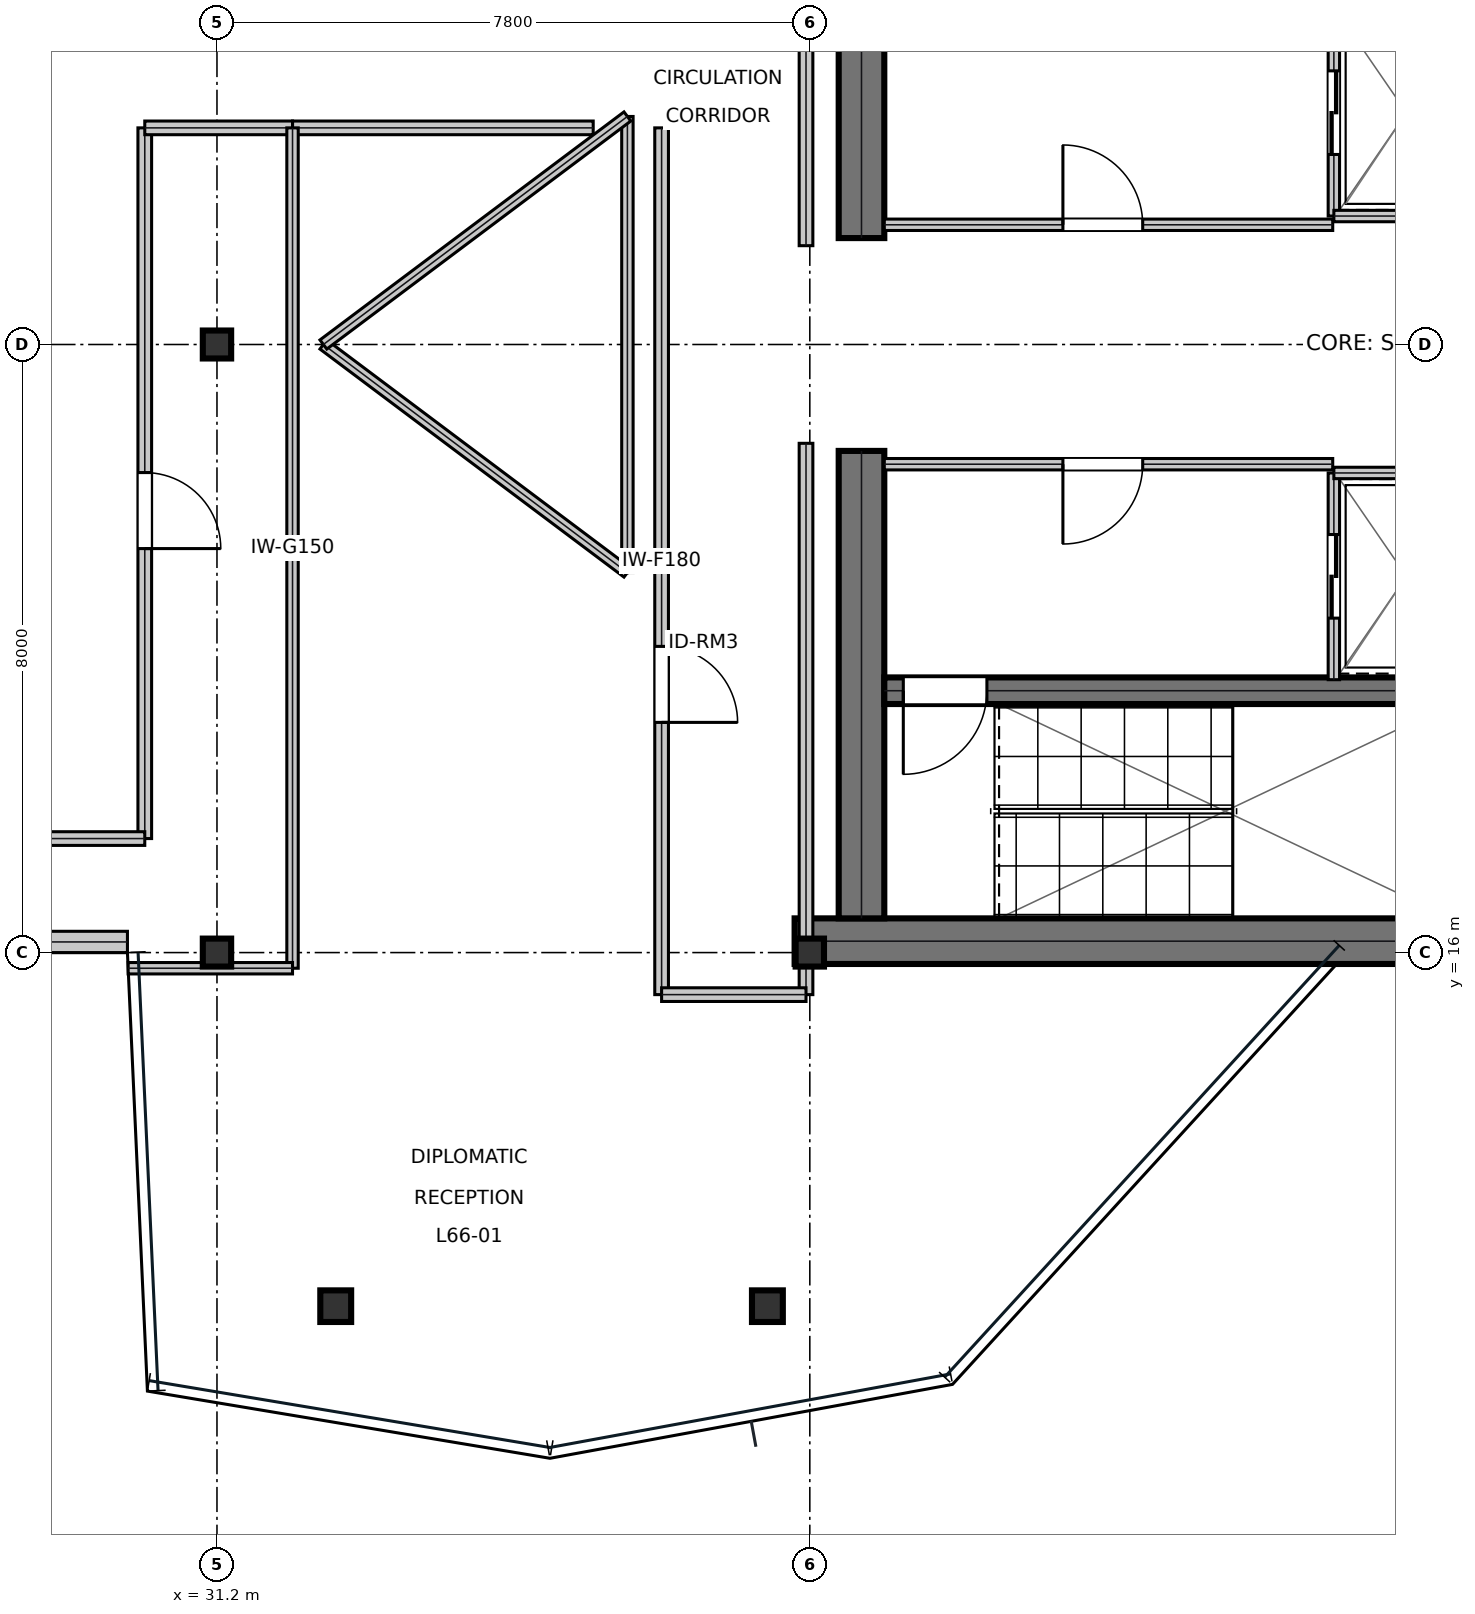
"""IFC4 building model, lengths in metres.
Left out: names, types, materials, properties, quantities, classifications, styles, units other than length and angle.
Written with IfcOpenShell. Run it as: python <this file> out.ifc"""

import sys

from ifc_helpers import new_model, si_unit, direction, frame, frame_2d, origin, origin_2d, place, context, subcontext, project, spatial, rectangle, i_section, extrude, element, fill, save


model = new_model("IFC4")
c1 = context("Model", 3, precision=1e-05, world=origin(), true_north=direction((0.0, 1.0)))
c2 = subcontext(c1, "Body", "Model", "MODEL_VIEW")
j1 = project(units=[si_unit("LENGTHUNIT", "METRE"), si_unit("PLANEANGLEUNIT", "RADIAN")], contexts=[c1])
p1 = place(None, origin())
s1 = spatial("IfcSite", under=j1, at=p1, CompositionType="ELEMENT")
p2 = place(p1, origin())
s2 = spatial("IfcBuilding", under=s1, at=p2, CompositionType="ELEMENT")
p3 = place(p2, frame((0.0, 0.0, 283.05)))
s3 = spatial("IfcBuildingStorey", under=s2, at=p3, CompositionType="ELEMENT", Elevation=283.05)
p4 = place(p3, frame((38.8, 16.15, 0.0), z_axis=(0.0, 0.0, 1.0), x_axis=(1.0, 0.0, 0.0)))
e1 = element("IfcWall", 1, at=p4, inside=s3, PredefinedType="SHEAR", context=c2, shape_type="SweptSolid", body=[
    extrude(rectangle(XDim=16.0, YDim=0.6, at=frame_2d((8.0, 0.0))), origin(), (0.0, 0.0, 1.0), 3.81),
])
for number, where, z_axis, x_axis in (
    (2, (39.68, 16.45, 0.0), (0.0, 0.0, 1.0), (0.0, 1.0, 0.0)),
    (3, (39.68, 25.4, 0.0), (0.0, 0.0, 1.0), (0.0, 1.0, 0.0)),
):
    element("IfcWall", number, at=place(p3, frame(where, z_axis=z_axis, x_axis=x_axis)), inside=s3, PredefinedType="SHEAR", context=c2, shape_type="SweptSolid", body=[
        extrude(rectangle(XDim=6.15, YDim=0.6, at=frame_2d((3.075, 0.0))), origin(), (0.0, 0.0, 1.0), 3.81),
    ])
p5 = place(p3, frame((39.98, 19.445, 0.0), z_axis=(0.0, 0.0, 1.0), x_axis=(1.0, 0.0, 0.0)))
e4 = element("IfcWall", 4, at=p5, inside=s3, PredefinedType="SHEAR", context=c2, shape_type="SweptSolid", body=[
    extrude(rectangle(XDim=7.71, YDim=0.35, at=frame_2d((3.855, 0.0))), origin(), (0.0, 0.0, 1.0), 3.81),
])
p6 = place(p5, frame((0.25, 0.0, 0.0)))
e5 = element("IfcOpeningElement", 5, at=p6, cuts=e4, PredefinedType="OPENING", context=c2, shape_type="SweptSolid", body=[
    extrude(rectangle(XDim=1.1, YDim=2.15, at=frame_2d((0.55, 1.075))), frame((0.0, 0.185, 0.0), z_axis=(0.0, -1.0, 0.0), x_axis=(1.0, 0.0, 0.0)), (0.0, 0.0, 1.0), 0.37),
])
for number, where, z_axis, x_axis in (
    (6, (31.2, 16.0, 0.0), (0.0, 0.0, 1.0), (1.0, 0.0, 0.0)),
    (7, (31.2, 24.0, 0.0), (0.0, 0.0, 1.0), (1.0, 0.0, 0.0)),
    (8, (39.0, 16.0, 0.0), (0.0, 0.0, 1.0), (1.0, 0.0, 0.0)),
):
    element("IfcColumn", number, at=place(p3, frame(where, z_axis=z_axis, x_axis=x_axis)), inside=s3, PredefinedType="COLUMN", context=c2, shape_type="SweptSolid", body=[
        extrude(i_section(OverallWidth=0.373, OverallDepth=0.368, WebThickness=0.015, FlangeThickness=0.024, at=origin_2d()), origin(), (0.0, 0.0, 1.0), 4.044),
    ])
for number, where, z_axis, x_axis in (
    (9, (32.762, 11.348, 0.016), (0.0, 0.0, 1.0), (1.0, 0.0, 0.0)),
    (10, (38.442, 11.348, 0.016), (0.0, 0.0, 1.0), (1.0, 0.0, 0.0)),
):
    element("IfcColumn", number, at=place(p3, frame(where, z_axis=z_axis, x_axis=x_axis)), inside=s3, PredefinedType="COLUMN", context=c2, shape_type="SweptSolid", body=[
        extrude(i_section(OverallWidth=0.406, OverallDepth=0.416, WebThickness=0.03, FlangeThickness=0.048, at=origin_2d()), origin(), (0.0, 0.0, 1.0), 4.018),
    ])
p7 = place(p3, frame((27.186, 16.14, 0.0), z_axis=(0.0, 0.0, 1.0), x_axis=(1.0, 0.0, 0.0)))
e11 = element("IfcWall", 11, at=p7, inside=s3, PredefinedType="STANDARD", context=c2, shape_type="SweptSolid", body=[
    extrude(rectangle(XDim=2.836, YDim=0.28, at=frame_2d((1.418, 0.0))), origin(), (0.0, 0.0, 1.0), 3.81),
])
p8 = place(p3, frame((39.98, 25.575, 0.0), z_axis=(0.0, 0.0, 1.0), x_axis=(1.0, 0.0, 0.0)))
e12 = element("IfcWall", 12, at=p8, inside=s3, PredefinedType="PARTITIONING", context=c2, shape_type="SweptSolid", body=[
    extrude(rectangle(XDim=5.9, YDim=0.15, at=frame_2d((2.95, 0.0))), origin(), (0.0, 0.0, 1.0), 3.81),
])
p9 = place(p8, frame((2.35, 0.0, 0.0)))
e13 = element("IfcOpeningElement", 13, at=p9, cuts=e12, PredefinedType="OPENING", context=c2, shape_type="SweptSolid", body=[
    extrude(rectangle(XDim=1.05, YDim=2.15, at=frame_2d((0.525, 1.075))), frame((0.0, 0.085, 0.0), z_axis=(0.0, -1.0, 0.0), x_axis=(1.0, 0.0, 0.0)), (0.0, 0.0, 1.0), 0.17),
])
p10 = place(p3, frame((39.98, 22.425, 0.0), z_axis=(0.0, 0.0, 1.0), x_axis=(1.0, 0.0, 0.0)))
e14 = element("IfcWall", 14, at=p10, inside=s3, PredefinedType="PARTITIONING", context=c2, shape_type="SweptSolid", body=[
    extrude(rectangle(XDim=5.9, YDim=0.15, at=frame_2d((2.95, 0.0))), origin(), (0.0, 0.0, 1.0), 3.81),
])
p11 = place(p10, frame((2.35, 0.0, 0.0)))
e15 = element("IfcOpeningElement", 15, at=p11, cuts=e14, PredefinedType="OPENING", context=c2, shape_type="SweptSolid", body=[
    extrude(rectangle(XDim=1.05, YDim=2.15, at=frame_2d((0.525, 1.075))), frame((0.0, 0.085, 0.0), z_axis=(0.0, -1.0, 0.0), x_axis=(1.0, 0.0, 0.0)), (0.0, 0.0, 1.0), 0.17),
])
p12 = place(p3, frame((45.895, 25.69, 0.0), z_axis=(0.0, 0.0, 1.0), x_axis=(0.0, 1.0, 0.0)))
e16 = element("IfcWall", 16, at=p12, inside=s3, PredefinedType="PARTITIONING", context=c2, shape_type="SweptSolid", body=[
    extrude(rectangle(XDim=2.72, YDim=0.15, at=frame_2d((1.36, 0.0))), origin(), (0.0, 0.0, 1.0), 3.81),
])
p13 = place(p12, frame((0.81, 0.0, 0.0)))
e17 = element("IfcOpeningElement", 17, at=p13, cuts=e16, PredefinedType="OPENING", context=c2, shape_type="SweptSolid", body=[
    extrude(rectangle(XDim=1.1, YDim=2.15, at=frame_2d((0.55, 1.075))), frame((0.0, 0.085, 0.0), z_axis=(0.0, -1.0, 0.0), x_axis=(1.0, 0.0, 0.0)), (0.0, 0.0, 1.0), 0.17),
])
p14 = place(p3, frame((45.895, 25.69, 0.0), z_axis=(0.0, 0.0, 1.0), x_axis=(1.0, 0.0, 0.0)))
e18 = element("IfcWall", 18, at=p14, inside=s3, PredefinedType="PARTITIONING", context=c2, shape_type="SweptSolid", body=[
    extrude(rectangle(XDim=1.915, YDim=0.15, at=frame_2d((0.958, 0.0))), origin(), (0.0, 0.0, 1.0), 3.81),
])
p15 = place(p3, frame((45.895, 19.59, 0.0), z_axis=(0.0, 0.0, 1.0), x_axis=(0.0, 1.0, 0.0)))
e19 = element("IfcWall", 19, at=p15, inside=s3, PredefinedType="PARTITIONING", context=c2, shape_type="SweptSolid", body=[
    extrude(rectangle(XDim=2.72, YDim=0.15, at=frame_2d((1.36, 0.0))), origin(), (0.0, 0.0, 1.0), 3.81),
])
p16 = place(p15, frame((0.81, 0.0, 0.0)))
e20 = element("IfcOpeningElement", 20, at=p16, cuts=e19, PredefinedType="OPENING", context=c2, shape_type="SweptSolid", body=[
    extrude(rectangle(XDim=1.1, YDim=2.15, at=frame_2d((0.55, 1.075))), frame((0.0, 0.085, 0.0), z_axis=(0.0, -1.0, 0.0), x_axis=(1.0, 0.0, 0.0)), (0.0, 0.0, 1.0), 0.17),
])
p17 = place(p3, frame((45.895, 22.31, 0.0), z_axis=(0.0, 0.0, 1.0), x_axis=(1.0, 0.0, 0.0)))
e21 = element("IfcWall", 21, at=p17, inside=s3, PredefinedType="PARTITIONING", context=c2, shape_type="SweptSolid", body=[
    extrude(rectangle(XDim=1.915, YDim=0.15, at=frame_2d((0.958, 0.0))), origin(), (0.0, 0.0, 1.0), 3.81),
])
p18 = place(p3, frame((37.05, 15.447, 0.0), z_axis=(0.0, 0.0, 1.0), x_axis=(0.0, 1.0, 0.0)))
e22 = element("IfcWall", 22, at=p18, inside=s3, PredefinedType="SOLIDWALL", context=c2, shape_type="SweptSolid", body=[
    extrude(rectangle(XDim=11.403, YDim=0.18, at=frame_2d((5.702, 0.0))), origin(), (0.0, 0.0, 1.0), 3.27),
])
p19 = place(p18, frame((3.582, 0.0, 0.0)))
e23 = element("IfcOpeningElement", 23, at=p19, cuts=e22, PredefinedType="OPENING", context=c2, shape_type="SweptSolid", body=[
    extrude(rectangle(XDim=1.0, YDim=2.15, at=frame_2d((0.5, 1.075))), frame((0.0, 0.1, 0.0), z_axis=(0.0, -1.0, 0.0), x_axis=(1.0, 0.0, 0.0)), (0.0, 0.0, 1.0), 0.2),
])
p20 = place(p3, frame((30.25, 17.5, 0.0), z_axis=(0.0, 0.0, 1.0), x_axis=(0.0, 1.0, 0.0)))
e24 = element("IfcWall", 24, at=p20, inside=s3, PredefinedType="SOLIDWALL", context=c2, shape_type="SweptSolid", body=[
    extrude(rectangle(XDim=9.35, YDim=0.18, at=frame_2d((4.675, 0.0))), origin(), (0.0, 0.0, 1.0), 3.27),
])
p21 = place(p20, frame((3.815, 0.0, 0.0)))
e25 = element("IfcOpeningElement", 25, at=p21, cuts=e24, PredefinedType="OPENING", context=c2, shape_type="SweptSolid", body=[
    extrude(rectangle(XDim=1.0, YDim=2.15, at=frame_2d((0.5, 1.075))), frame((0.0, 0.1, 0.0), z_axis=(0.0, -1.0, 0.0), x_axis=(1.0, 0.0, 0.0)), (0.0, 0.0, 1.0), 0.2),
])
p22 = place(p3, frame((38.95, 15.447, 0.0), z_axis=(0.0, 0.0, 1.0), x_axis=(0.0, 1.0, 0.0)))
e26 = element("IfcWall", 26, at=p22, inside=s3, PredefinedType="SOLIDWALL", context=c2, shape_type="SweptSolid", body=[
    extrude(rectangle(XDim=7.253, YDim=0.18, at=frame_2d((3.626, 0.0))), origin(), (0.0, 0.0, 1.0), 3.27),
])
p23 = place(p3, frame((32.194, 26.85, 0.0), z_axis=(0.0, 0.0, 1.0), x_axis=(1.0, 0.0, 0.0)))
e27 = element("IfcWall", 27, at=p23, inside=s3, PredefinedType="SOLIDWALL", context=c2, shape_type="SweptSolid", body=[
    extrude(rectangle(XDim=3.956, YDim=0.18, at=frame_2d((1.978, 0.0))), origin(), (0.0, 0.0, 1.0), 3.81),
])
p24 = place(p3, frame((37.05, 15.447, 0.0), z_axis=(0.0, 0.0, 1.0), x_axis=(1.0, 0.0, 0.0)))
e28 = element("IfcWall", 28, at=p24, inside=s3, PredefinedType="SOLIDWALL", context=c2, shape_type="SweptSolid", body=[
    extrude(rectangle(XDim=1.9, YDim=0.18, at=frame_2d((0.95, 0.0))), origin(), (0.0, 0.0, 1.0), 3.27),
])
p25 = place(p3, frame((30.25, 26.85, 0.0), z_axis=(0.0, 0.0, 1.0), x_axis=(1.0, 0.0, 0.0)))
e29 = element("IfcWall", 29, at=p25, inside=s3, PredefinedType="SOLIDWALL", context=c2, shape_type="SweptSolid", body=[
    extrude(rectangle(XDim=1.944, YDim=0.18, at=frame_2d((0.972, 0.0))), origin(), (0.0, 0.0, 1.0), 3.27),
])
p26 = place(p3, frame((28.55, 17.5, 0.0), z_axis=(0.0, 0.0, 1.0), x_axis=(1.0, 0.0, 0.0)))
e30 = element("IfcWall", 30, at=p26, inside=s3, PredefinedType="SOLIDWALL", context=c2, shape_type="SweptSolid", body=[
    extrude(rectangle(XDim=1.7, YDim=0.18, at=frame_2d((0.85, 0.0))), origin(), (0.0, 0.0, 1.0), 3.81),
])
p27 = place(p3, frame((38.95, 25.3, 0.0), z_axis=(0.0, 0.0, 1.0), x_axis=(0.0, 1.0, 0.0)))
e31 = element("IfcWall", 31, at=p27, inside=s3, PredefinedType="SOLIDWALL", context=c2, shape_type="SweptSolid", body=[
    extrude(rectangle(XDim=7.253, YDim=0.18, at=frame_2d((3.626, 0.0))), origin(), (0.0, 0.0, 1.0), 3.27),
])
p28 = place(p3, frame((32.194, 15.794, 0.0), z_axis=(0.0, 0.0, 1.0), x_axis=(0.0, 1.0, 0.0)))
e32 = element("IfcWall", 32, at=p28, inside=s3, PredefinedType="MOVABLE", context=c2, shape_type="SweptSolid", body=[
    extrude(rectangle(XDim=11.056, YDim=0.15, at=frame_2d((5.528, 0.0))), origin(), (0.0, 0.0, 1.0), 3.27),
])
p29 = place(p3, frame((30.031, 15.794, 0.0), z_axis=(0.0, 0.0, 1.0), x_axis=(1.0, 0.0, 0.0)))
e33 = element("IfcWall", 33, at=p29, inside=s3, PredefinedType="MOVABLE", context=c2, shape_type="SweptSolid", body=[
    extrude(rectangle(XDim=2.163, YDim=0.15, at=frame_2d((1.081, 0.0))), origin(), (0.0, 0.0, 1.0), 3.27),
])
p30 = place(p3, frame((32.6, 24.0, 0.0), z_axis=(0.0, 0.0, 1.0), x_axis=(0.8, -0.6, 0.0)))
e34 = element("IfcWall", 34, at=p30, inside=s3, PredefinedType="MOVABLE", context=c2, shape_type="SweptSolid", body=[
    extrude(rectangle(XDim=5.0, YDim=0.15, at=frame_2d((2.5, 0.0))), origin(), (0.0, 0.0, 1.0), 3.81),
])
p31 = place(p3, frame((36.6, 21.0, 0.0), z_axis=(0.0, 0.0, 1.0), x_axis=(0.0, 1.0, 0.0)))
e35 = element("IfcWall", 35, at=p31, inside=s3, PredefinedType="MOVABLE", context=c2, shape_type="SweptSolid", body=[
    extrude(rectangle(XDim=6.0, YDim=0.15, at=frame_2d((3.0, 0.0))), origin(), (0.0, 0.0, 1.0), 3.81),
])
p32 = place(p3, frame((36.6, 27.0, 0.0), z_axis=(0.0, 0.0, 1.0), x_axis=(-0.8, -0.6, 0.0)))
e36 = element("IfcWall", 36, at=p32, inside=s3, PredefinedType="MOVABLE", context=c2, shape_type="SweptSolid", body=[
    extrude(rectangle(XDim=5.0, YDim=0.15, at=frame_2d((2.5, 0.0))), origin(), (0.0, 0.0, 1.0), 3.81),
])
p33 = place(p9, origin())
e37 = element("IfcDoor", 37, at=p33, inside=s3, OperationType="SINGLE_SWING_LEFT", PredefinedType="DOOR", context=c2, shape_type="SweptSolid", body=[
    extrude(rectangle(XDim=1.05, YDim=2.15, at=frame_2d((0.525, 1.075))), frame((0.0, 0.025, 0.0), z_axis=(0.0, -1.0, 0.0), x_axis=(1.0, 0.0, 0.0)), (0.0, 0.0, 1.0), 0.05),
])
fill(e13, e37)
p34 = place(p11, frame((1.05, 0.0, 0.0), z_axis=(0.0, 0.0, 1.0), x_axis=(-1.0, 0.0, 0.0)))
e38 = element("IfcDoor", 38, at=p34, inside=s3, OperationType="SINGLE_SWING_RIGHT", PredefinedType="DOOR", context=c2, shape_type="SweptSolid", body=[
    extrude(rectangle(XDim=1.05, YDim=2.15, at=frame_2d((0.525, 1.075))), frame((0.0, 0.025, 0.0), z_axis=(0.0, -1.0, 0.0), x_axis=(1.0, 0.0, 0.0)), (0.0, 0.0, 1.0), 0.05),
])
fill(e15, e38)
p35 = place(p13, frame((1.1, 0.0, 0.0), z_axis=(0.0, 0.0, 1.0), x_axis=(-1.0, 0.0, 0.0)))
e39 = element("IfcDoor", 39, at=p35, inside=s3, OperationType="DOUBLE_DOOR_SLIDING", PredefinedType="DOOR", context=c2, shape_type="SweptSolid", body=[
    extrude(rectangle(XDim=1.1, YDim=2.15, at=frame_2d((0.55, 1.075))), frame((0.0, 0.025, 0.0), z_axis=(0.0, -1.0, 0.0), x_axis=(1.0, 0.0, 0.0)), (0.0, 0.0, 1.0), 0.05),
])
fill(e17, e39)
p36 = place(p16, frame((1.1, 0.0, 0.0), z_axis=(0.0, 0.0, 1.0), x_axis=(-1.0, 0.0, 0.0)))
e40 = element("IfcDoor", 40, at=p36, inside=s3, OperationType="DOUBLE_DOOR_SLIDING", PredefinedType="DOOR", context=c2, shape_type="SweptSolid", body=[
    extrude(rectangle(XDim=1.1, YDim=2.15, at=frame_2d((0.55, 1.075))), frame((0.0, 0.025, 0.0), z_axis=(0.0, -1.0, 0.0), x_axis=(1.0, 0.0, 0.0)), (0.0, 0.0, 1.0), 0.05),
])
fill(e20, e40)
p37 = place(p19, frame((1.0, 0.0, 0.0), z_axis=(0.0, 0.0, 1.0), x_axis=(-1.0, 0.0, 0.0)))
e41 = element("IfcDoor", 41, at=p37, inside=s3, OperationType="SINGLE_SWING_RIGHT", PredefinedType="DOOR", context=c2, shape_type="SweptSolid", body=[
    extrude(rectangle(XDim=1.0, YDim=2.15, at=frame_2d((0.5, 1.075))), frame((0.0, 0.025, 0.0), z_axis=(0.0, -1.0, 0.0), x_axis=(1.0, 0.0, 0.0)), (0.0, 0.0, 1.0), 0.05),
])
fill(e23, e41)
p38 = place(p21, frame((1.0, 0.0, 0.0), z_axis=(0.0, 0.0, 1.0), x_axis=(-1.0, 0.0, 0.0)))
e42 = element("IfcDoor", 42, at=p38, inside=s3, OperationType="SINGLE_SWING_RIGHT", PredefinedType="DOOR", context=c2, shape_type="SweptSolid", body=[
    extrude(rectangle(XDim=1.0, YDim=2.15, at=frame_2d((0.5, 1.075))), frame((0.0, 0.025, 0.0), z_axis=(0.0, -1.0, 0.0), x_axis=(1.0, 0.0, 0.0)), (0.0, 0.0, 1.0), 0.05),
])
fill(e25, e42)
p39 = place(p6, frame((1.1, 0.0, 0.0), z_axis=(0.0, 0.0, 1.0), x_axis=(-1.0, 0.0, 0.0)))
e43 = element("IfcDoor", 43, at=p39, inside=s3, OperationType="SINGLE_SWING_RIGHT", PredefinedType="DOOR", context=c2, shape_type="SweptSolid", body=[
    extrude(rectangle(XDim=1.1, YDim=2.15, at=frame_2d((0.55, 1.075))), frame((0.0, 0.025, 0.0), z_axis=(0.0, -1.0, 0.0), x_axis=(1.0, 0.0, 0.0)), (0.0, 0.0, 1.0), 0.05),
])
fill(e5, e43)
save(model, sys.argv[1])
